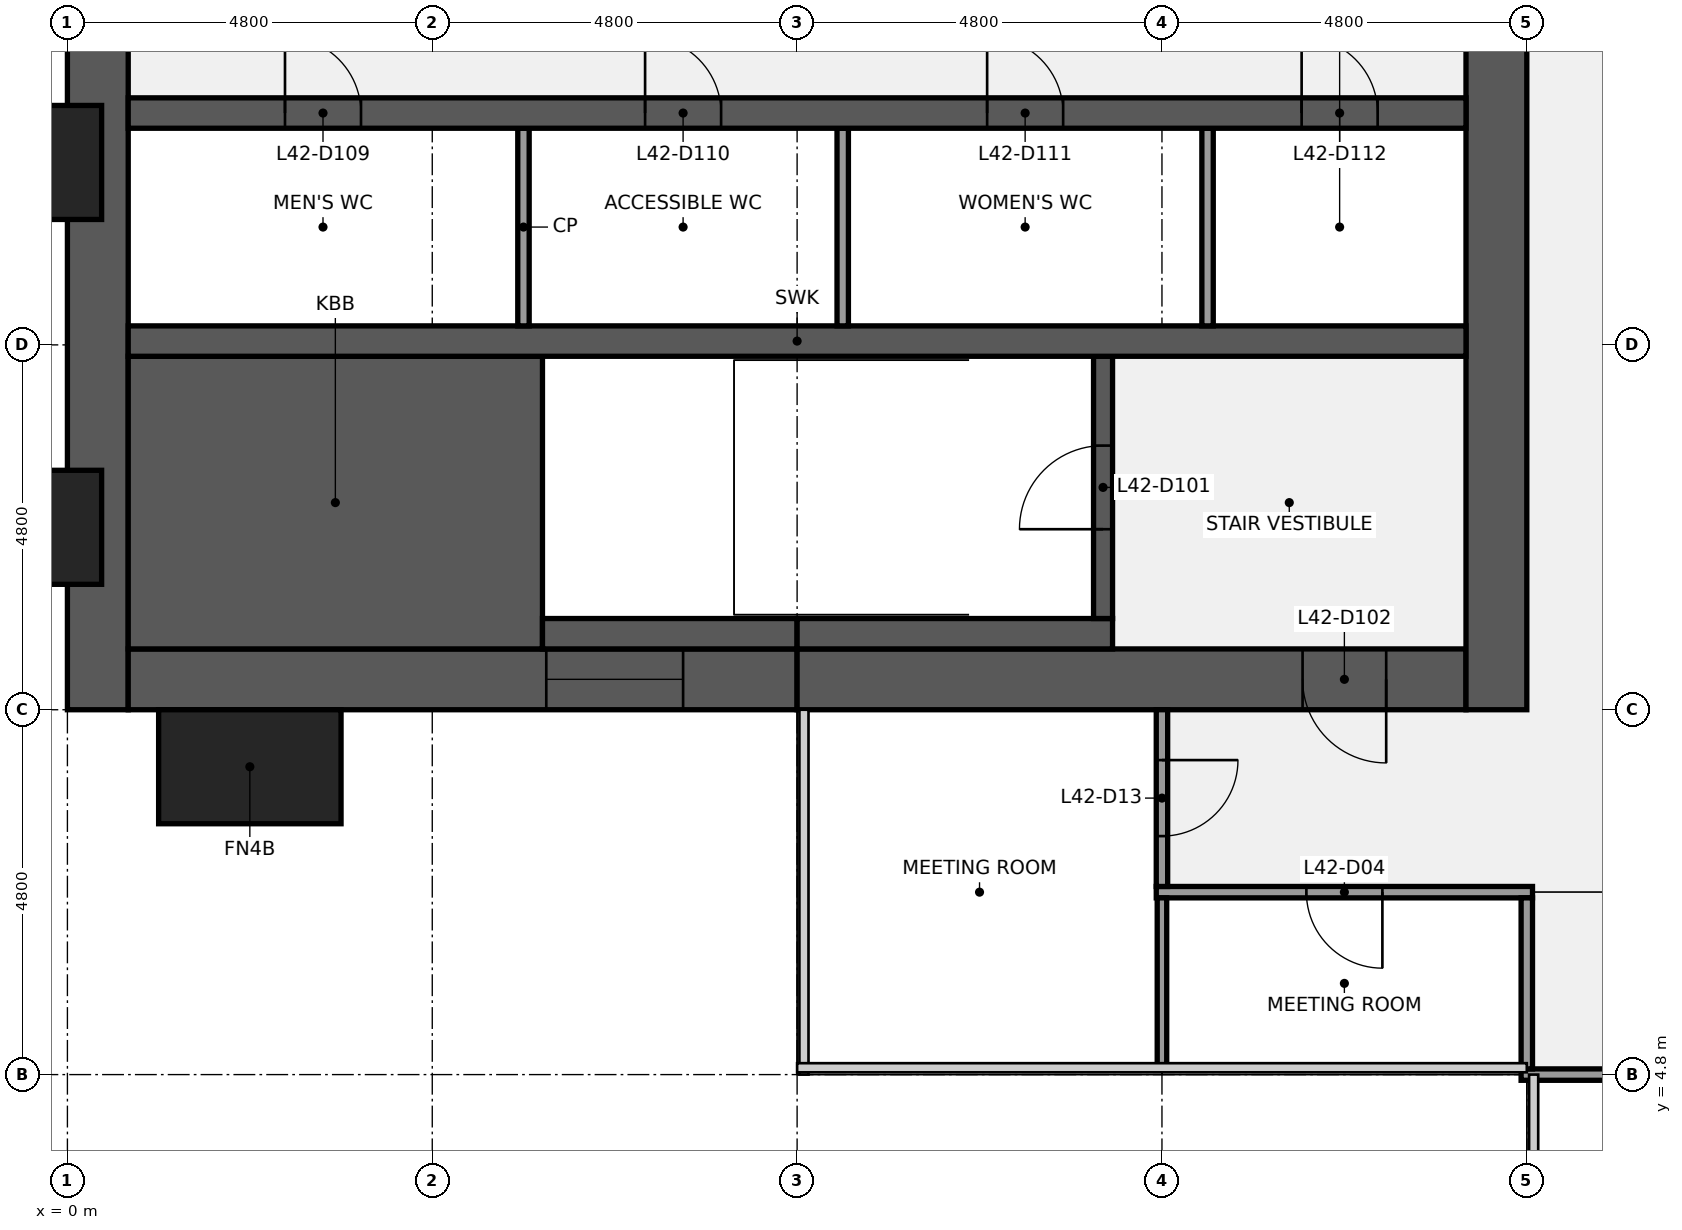
"""IFC4 building model, lengths in metres.
Left out: names, types, materials, properties, quantities, classifications, styles, units other than length and angle.
Written with IfcOpenShell. Run it as: python <this file> out.ifc"""

import sys

from ifc_helpers import new_model, si_unit, direction, frame, frame_2d, origin, origin_2d, place, context, subcontext, project, spatial, rectangle, extrude, element, fill, save


model = new_model("IFC4")
c1 = context("Model", 3, precision=1e-05, world=origin(), true_north=direction((0.0, 1.0)))
c2 = subcontext(c1, "Body", "Model", "MODEL_VIEW")
j1 = project(units=[si_unit("LENGTHUNIT", "METRE"), si_unit("PLANEANGLEUNIT", "RADIAN")], contexts=[c1])
p1 = place(None, origin())
s1 = spatial("IfcSite", under=j1, at=p1, CompositionType="ELEMENT")
p2 = place(p1, origin())
s2 = spatial("IfcBuilding", under=s1, at=p2, CompositionType="ELEMENT")
p3 = place(p2, frame((0.0, 0.0, 197.2)))
s3 = spatial("IfcBuildingStorey", under=s2, at=p3, CompositionType="ELEMENT", Elevation=197.2)
p4 = place(p3, frame((0.4, 9.6, 0.0), z_axis=(0.0, 0.0, 1.0), x_axis=(0.0, 1.0, 0.0)))
e1 = element("IfcWall", 1, at=p4, inside=s3, PredefinedType="SHEAR", context=c2, shape_type="SweptSolid", body=[
    extrude(rectangle(XDim=28.8, YDim=0.8, at=frame_2d((14.4, 0.0))), origin(), (0.0, 0.0, 1.0), 3.84),
])
p5 = place(p4, frame((8.85, 0.0, 0.9)))
e2 = element("IfcOpeningElement", 2, at=p5, cuts=e1, PredefinedType="OPENING", context=c2, shape_type="SweptSolid", body=[
    extrude(rectangle(XDim=1.5, YDim=1.5, at=frame_2d((0.75, 0.75))), frame((0.0, 0.41, 0.0), z_axis=(0.0, -1.0, 0.0), x_axis=(1.0, 0.0, 0.0)), (0.0, 0.0, 1.0), 0.82),
])
p6 = place(p4, frame((18.45, 0.0, 0.9)))
e3 = element("IfcOpeningElement", 3, at=p6, cuts=e1, PredefinedType="OPENING", context=c2, shape_type="SweptSolid", body=[
    extrude(rectangle(XDim=1.5, YDim=1.5, at=frame_2d((0.75, 0.75))), frame((0.0, 0.41, 0.0), z_axis=(0.0, -1.0, 0.0), x_axis=(1.0, 0.0, 0.0)), (0.0, 0.0, 1.0), 0.82),
])
p7 = place(p3, frame((9.6, 10.0, 0.0), z_axis=(0.0, 0.0, 1.0), x_axis=(-1.0, 0.0, 0.0)))
e4 = element("IfcWall", 4, at=p7, inside=s3, PredefinedType="SHEAR", context=c2, shape_type="SweptSolid", body=[
    extrude(rectangle(XDim=8.8, YDim=0.8, at=frame_2d((4.4, 0.0))), origin(), (0.0, 0.0, 1.0), 3.84),
])
p8 = place(p7, frame((1.5, 0.0, 0.9)))
e5 = element("IfcOpeningElement", 5, at=p8, cuts=e4, PredefinedType="OPENING", context=c2, shape_type="SweptSolid", body=[
    extrude(rectangle(XDim=1.8, YDim=1.5, at=frame_2d((0.9, 0.75))), frame((0.0, 0.41, 0.0), z_axis=(0.0, -1.0, 0.0), x_axis=(1.0, 0.0, 0.0)), (0.0, 0.0, 1.0), 0.82),
])
p9 = place(p3, frame((18.4, 10.0, 0.0), z_axis=(0.0, 0.0, 1.0), x_axis=(-1.0, 0.0, 0.0)))
e6 = element("IfcWall", 6, at=p9, inside=s3, PredefinedType="SHEAR", context=c2, shape_type="SweptSolid", body=[
    extrude(rectangle(XDim=8.8, YDim=0.8, at=frame_2d((4.4, 0.0))), origin(), (0.0, 0.0, 1.0), 3.84),
])
p10 = place(p9, frame((1.05, 0.0, 0.0)))
e7 = element("IfcOpeningElement", 7, at=p10, cuts=e6, PredefinedType="OPENING", context=c2, shape_type="SweptSolid", body=[
    extrude(rectangle(XDim=1.1, YDim=2.1, at=frame_2d((0.55, 1.05))), frame((0.0, 0.41, 0.0), z_axis=(0.0, -1.0, 0.0), x_axis=(1.0, 0.0, 0.0)), (0.0, 0.0, 1.0), 0.82),
])
p11 = place(p3, frame((18.8, 38.4, 0.0), z_axis=(0.0, 0.0, 1.0), x_axis=(0.0, -1.0, 0.0)))
e8 = element("IfcWall", 8, at=p11, inside=s3, PredefinedType="SHEAR", context=c2, shape_type="SweptSolid", body=[
    extrude(rectangle(XDim=28.8, YDim=0.8, at=frame_2d((14.4, 0.0))), origin(), (0.0, 0.0, 1.0), 3.84),
])
p12 = place(p11, frame((18.3, 0.0, 0.0)))
e9 = element("IfcOpeningElement", 9, at=p12, cuts=e8, PredefinedType="OPENING", context=c2, shape_type="SweptSolid", body=[
    extrude(rectangle(XDim=1.8, YDim=2.1, at=frame_2d((0.9, 1.05))), frame((0.0, 0.41, 0.0), z_axis=(0.0, -1.0, 0.0), x_axis=(1.0, 0.0, 0.0)), (0.0, 0.0, 1.0), 0.82),
])
p13 = place(p11, frame((8.7, 0.0, 0.0)))
e10 = element("IfcOpeningElement", 10, at=p13, cuts=e8, PredefinedType="OPENING", context=c2, shape_type="SweptSolid", body=[
    extrude(rectangle(XDim=1.8, YDim=2.1, at=frame_2d((0.9, 1.05))), frame((0.0, 0.41, 0.0), z_axis=(0.0, -1.0, 0.0), x_axis=(1.0, 0.0, 0.0)), (0.0, 0.0, 1.0), 0.82),
])
p14 = place(p3, frame((0.8, 12.325, 0.0), z_axis=(0.0, 0.0, 1.0), x_axis=(1.0, 0.0, 0.0)))
e11 = element("IfcWall", 11, at=p14, inside=s3, PredefinedType="SHEAR", context=c2, shape_type="SweptSolid", body=[
    extrude(rectangle(XDim=5.45, YDim=3.85, at=frame_2d((2.725, 0.0))), origin(), (0.0, 0.0, 1.0), 3.84),
])
p15 = place(p3, frame((6.25, 10.6, 0.0), z_axis=(0.0, 0.0, 1.0), x_axis=(1.0, 0.0, 0.0)))
e12 = element("IfcWall", 12, at=p15, inside=s3, PredefinedType="SHEAR", context=c2, shape_type="SweptSolid", body=[
    extrude(rectangle(XDim=3.35, YDim=0.4, at=frame_2d((1.675, 0.0))), origin(), (0.0, 0.0, 1.0), 3.84),
])
p16 = place(p3, frame((9.6, 10.6, 0.0), z_axis=(0.0, 0.0, 1.0), x_axis=(1.0, 0.0, 0.0)))
e13 = element("IfcWall", 13, at=p16, inside=s3, PredefinedType="SHEAR", context=c2, shape_type="SweptSolid", body=[
    extrude(rectangle(XDim=4.15, YDim=0.4, at=frame_2d((2.075, 0.0))), origin(), (0.0, 0.0, 1.0), 3.84),
])
p17 = place(p3, frame((13.625, 10.8, 0.0), z_axis=(0.0, 0.0, 1.0), x_axis=(0.0, 1.0, 0.0)))
e14 = element("IfcWall", 14, at=p17, inside=s3, PredefinedType="SHEAR", context=c2, shape_type="SweptSolid", body=[
    extrude(rectangle(XDim=3.45, YDim=0.25, at=frame_2d((1.725, 0.0))), origin(), (0.0, 0.0, 1.0), 3.84),
])
p18 = place(p17, frame((1.175, 0.0, 0.0)))
e15 = element("IfcOpeningElement", 15, at=p18, cuts=e14, PredefinedType="OPENING", context=c2, shape_type="SweptSolid", body=[
    extrude(rectangle(XDim=1.1, YDim=2.1, at=frame_2d((0.55, 1.05))), frame((0.0, 0.135, 0.0), z_axis=(0.0, -1.0, 0.0), x_axis=(1.0, 0.0, 0.0)), (0.0, 0.0, 1.0), 0.27),
])
p19 = place(p3, frame((0.8, 14.45, 0.0), z_axis=(0.0, 0.0, 1.0), x_axis=(1.0, 0.0, 0.0)))
e16 = element("IfcWall", 16, at=p19, inside=s3, PredefinedType="SHEAR", context=c2, shape_type="SweptSolid", body=[
    extrude(rectangle(XDim=17.6, YDim=0.4, at=frame_2d((8.8, 0.0))), origin(), (0.0, 0.0, 1.0), 3.84),
])
for number, where, z_axis, x_axis in (
    (17, (6.0, 14.65, 0.0), (0.0, 0.0, 1.0), (0.0, 1.0, 0.0)),
    (18, (10.2, 14.65, 0.0), (0.0, 0.0, 1.0), (0.0, 1.0, 0.0)),
    (19, (15.0, 14.65, 0.0), (0.0, 0.0, 1.0), (0.0, 1.0, 0.0)),
):
    element("IfcWall", number, at=place(p3, frame(where, z_axis=z_axis, x_axis=x_axis)), inside=s3, PredefinedType="PARTITIONING", context=c2, shape_type="SweptSolid", body=[
        extrude(rectangle(XDim=2.6, YDim=0.15, at=frame_2d((1.3, 0.0))), origin(), (0.0, 0.0, 1.0), 3.84),
    ])
p20 = place(p3, frame((0.8, 17.45, 0.0), z_axis=(0.0, 0.0, 1.0), x_axis=(1.0, 0.0, 0.0)))
e20 = element("IfcWall", 20, at=p20, inside=s3, PredefinedType="SHEAR", context=c2, shape_type="SweptSolid", body=[
    extrude(rectangle(XDim=17.6, YDim=0.4, at=frame_2d((8.8, 0.0))), origin(), (0.0, 0.0, 1.0), 3.84),
])
p21 = place(p20, frame((2.062, 0.0, 0.0)))
e21 = element("IfcOpeningElement", 21, at=p21, cuts=e20, PredefinedType="OPENING", context=c2, shape_type="SweptSolid", body=[
    extrude(rectangle(XDim=1.0, YDim=2.1, at=frame_2d((0.5, 1.05))), frame((0.0, 0.21, 0.0), z_axis=(0.0, -1.0, 0.0), x_axis=(1.0, 0.0, 0.0)), (0.0, 0.0, 1.0), 0.42),
])
p22 = place(p20, frame((6.8, 0.0, 0.0)))
e22 = element("IfcOpeningElement", 22, at=p22, cuts=e20, PredefinedType="OPENING", context=c2, shape_type="SweptSolid", body=[
    extrude(rectangle(XDim=1.0, YDim=2.1, at=frame_2d((0.5, 1.05))), frame((0.0, 0.21, 0.0), z_axis=(0.0, -1.0, 0.0), x_axis=(1.0, 0.0, 0.0)), (0.0, 0.0, 1.0), 0.42),
])
p23 = place(p20, frame((11.3, 0.0, 0.0)))
e23 = element("IfcOpeningElement", 23, at=p23, cuts=e20, PredefinedType="OPENING", context=c2, shape_type="SweptSolid", body=[
    extrude(rectangle(XDim=1.0, YDim=2.1, at=frame_2d((0.5, 1.05))), frame((0.0, 0.21, 0.0), z_axis=(0.0, -1.0, 0.0), x_axis=(1.0, 0.0, 0.0)), (0.0, 0.0, 1.0), 0.42),
])
p24 = place(p20, frame((15.438, 0.0, 0.0)))
e24 = element("IfcOpeningElement", 24, at=p24, cuts=e20, PredefinedType="OPENING", context=c2, shape_type="SweptSolid", body=[
    extrude(rectangle(XDim=1.0, YDim=2.1, at=frame_2d((0.5, 1.05))), frame((0.0, 0.21, 0.0), z_axis=(0.0, -1.0, 0.0), x_axis=(1.0, 0.0, 0.0)), (0.0, 0.0, 1.0), 0.42),
])
p25 = place(p3, frame((19.125, 4.8, 0.0), z_axis=(0.0, 0.0, 1.0), x_axis=(1.0, 0.0, 0.0)))
e25 = element("IfcWall", 25, at=p25, inside=s3, PredefinedType="PARTITIONING", context=c2, shape_type="SweptSolid", body=[
    extrude(rectangle(XDim=19.35, YDim=0.15, at=frame_2d((9.675, 0.0))), origin(), (0.0, 0.0, 1.0), 2.87),
])
p26 = place(p25, frame((5.575, 0.0, 0.0)))
e26 = element("IfcOpeningElement", 26, at=p26, cuts=e25, PredefinedType="OPENING", context=c2, shape_type="SweptSolid", body=[
    extrude(rectangle(XDim=1.0, YDim=2.1, at=frame_2d((0.5, 1.05))), frame((0.0, 0.085, 0.0), z_axis=(0.0, -1.0, 0.0), x_axis=(1.0, 0.0, 0.0)), (0.0, 0.0, 1.0), 0.17),
])
p27 = place(p25, frame((13.975, 0.0, 0.0)))
e27 = element("IfcOpeningElement", 27, at=p27, cuts=e25, PredefinedType="OPENING", context=c2, shape_type="SweptSolid", body=[
    extrude(rectangle(XDim=1.0, YDim=2.1, at=frame_2d((0.5, 1.05))), frame((0.0, 0.085, 0.0), z_axis=(0.0, -1.0, 0.0), x_axis=(1.0, 0.0, 0.0)), (0.0, 0.0, 1.0), 0.17),
])
p28 = place(p25, frame((17.575, 0.0, 0.0)))
e28 = element("IfcOpeningElement", 28, at=p28, cuts=e25, PredefinedType="OPENING", context=c2, shape_type="SweptSolid", body=[
    extrude(rectangle(XDim=1.0, YDim=2.1, at=frame_2d((0.5, 1.05))), frame((0.0, 0.085, 0.0), z_axis=(0.0, -1.0, 0.0), x_axis=(1.0, 0.0, 0.0)), (0.0, 0.0, 1.0), 0.17),
])
p29 = place(p3, frame((14.325, 7.2, 0.0), z_axis=(0.0, 0.0, 1.0), x_axis=(1.0, 0.0, 0.0)))
e29 = element("IfcWall", 29, at=p29, inside=s3, PredefinedType="PARTITIONING", context=c2, shape_type="SweptSolid", body=[
    extrude(rectangle(XDim=4.95, YDim=0.15, at=frame_2d((2.475, 0.0))), origin(), (0.0, 0.0, 1.0), 2.87),
])
p30 = place(p29, frame((1.975, 0.0, 0.0)))
e30 = element("IfcOpeningElement", 30, at=p30, cuts=e29, PredefinedType="OPENING", context=c2, shape_type="SweptSolid", body=[
    extrude(rectangle(XDim=1.0, YDim=2.1, at=frame_2d((0.5, 1.05))), frame((0.0, 0.085, 0.0), z_axis=(0.0, -1.0, 0.0), x_axis=(1.0, 0.0, 0.0)), (0.0, 0.0, 1.0), 0.17),
])
p31 = place(p3, frame((14.4, 4.9, 0.0), z_axis=(0.0, 0.0, 1.0), x_axis=(0.0, 1.0, 0.0)))
e31 = element("IfcWall", 31, at=p31, inside=s3, PredefinedType="PARTITIONING", context=c2, shape_type="SweptSolid", body=[
    extrude(rectangle(XDim=2.225, YDim=0.125, at=frame_2d((1.113, 0.0))), origin(), (0.0, 0.0, 1.0), 2.87),
])
p32 = place(p3, frame((14.4, 7.275, 0.0), z_axis=(0.0, 0.0, 1.0), x_axis=(0.0, 1.0, 0.0)))
e32 = element("IfcWall", 32, at=p32, inside=s3, PredefinedType="PARTITIONING", context=c2, shape_type="SweptSolid", body=[
    extrude(rectangle(XDim=2.325, YDim=0.15, at=frame_2d((1.163, 0.0))), origin(), (0.0, 0.0, 1.0), 2.87),
])
p33 = place(p32, frame((0.663, 0.0, 0.0)))
e33 = element("IfcOpeningElement", 33, at=p33, cuts=e32, PredefinedType="OPENING", context=c2, shape_type="SweptSolid", body=[
    extrude(rectangle(XDim=1.0, YDim=2.1, at=frame_2d((0.5, 1.05))), frame((0.0, 0.085, 0.0), z_axis=(0.0, -1.0, 0.0), x_axis=(1.0, 0.0, 0.0)), (0.0, 0.0, 1.0), 0.17),
])
p34 = place(p3, frame((19.2, 4.875, 0.0), z_axis=(0.0, 0.0, 1.0), x_axis=(0.0, 1.0, 0.0)))
e34 = element("IfcWall", 34, at=p34, inside=s3, PredefinedType="PARTITIONING", context=c2, shape_type="SweptSolid", body=[
    extrude(rectangle(XDim=2.25, YDim=0.15, at=frame_2d((1.125, 0.0))), origin(), (0.0, 0.0, 1.0), 2.87),
])
for number, where, z_axis, x_axis in (
    (35, (-0.75, 12.0, 0.0), (0.0, 0.0, 1.0), (0.0, 1.0, 0.0)),
    (36, (-0.75, 16.8, 0.0), (0.0, 0.0, 1.0), (0.0, 1.0, 0.0)),
    (37, (2.4, 8.85, 0.0), (0.0, 0.0, 1.0), (1.0, 0.0, 0.0)),
):
    element("IfcColumn", number, at=place(p3, frame(where, z_axis=z_axis, x_axis=x_axis)), inside=s3, PredefinedType="PILASTER", context=c2, shape_type="SweptSolid", body=[
        extrude(rectangle(XDim=2.4, YDim=1.5, at=origin_2d()), origin(), (0.0, 0.0, 1.0), 4.0),
    ])
p35 = place(p18, origin())
e38 = element("IfcDoor", 38, at=p35, inside=s3, OperationType="SINGLE_SWING_LEFT", PredefinedType="DOOR", context=c2, shape_type="SweptSolid", body=[
    extrude(rectangle(XDim=1.1, YDim=2.1, at=frame_2d((0.55, 1.05))), frame((0.0, 0.025, 0.0), z_axis=(0.0, -1.0, 0.0), x_axis=(1.0, 0.0, 0.0)), (0.0, 0.0, 1.0), 0.05),
])
fill(e15, e38)
p36 = place(p10, origin())
e39 = element("IfcDoor", 39, at=p36, inside=s3, OperationType="SINGLE_SWING_LEFT", PredefinedType="DOOR", context=c2, shape_type="SweptSolid", body=[
    extrude(rectangle(XDim=1.1, YDim=2.1, at=frame_2d((0.55, 1.05))), frame((0.0, 0.025, 0.0), z_axis=(0.0, -1.0, 0.0), x_axis=(1.0, 0.0, 0.0)), (0.0, 0.0, 1.0), 0.05),
])
fill(e7, e39)
p37 = place(p21, origin())
e40 = element("IfcDoor", 40, at=p37, inside=s3, OperationType="SINGLE_SWING_LEFT", PredefinedType="DOOR", context=c2, shape_type="SweptSolid", body=[
    extrude(rectangle(XDim=1.0, YDim=2.1, at=frame_2d((0.5, 1.05))), frame((0.0, 0.025, 0.0), z_axis=(0.0, -1.0, 0.0), x_axis=(1.0, 0.0, 0.0)), (0.0, 0.0, 1.0), 0.05),
])
fill(e21, e40)
p38 = place(p22, origin())
e41 = element("IfcDoor", 41, at=p38, inside=s3, OperationType="SINGLE_SWING_LEFT", PredefinedType="DOOR", context=c2, shape_type="SweptSolid", body=[
    extrude(rectangle(XDim=1.0, YDim=2.1, at=frame_2d((0.5, 1.05))), frame((0.0, 0.025, 0.0), z_axis=(0.0, -1.0, 0.0), x_axis=(1.0, 0.0, 0.0)), (0.0, 0.0, 1.0), 0.05),
])
fill(e22, e41)
p39 = place(p23, origin())
e42 = element("IfcDoor", 42, at=p39, inside=s3, OperationType="SINGLE_SWING_LEFT", PredefinedType="DOOR", context=c2, shape_type="SweptSolid", body=[
    extrude(rectangle(XDim=1.0, YDim=2.1, at=frame_2d((0.5, 1.05))), frame((0.0, 0.025, 0.0), z_axis=(0.0, -1.0, 0.0), x_axis=(1.0, 0.0, 0.0)), (0.0, 0.0, 1.0), 0.05),
])
fill(e23, e42)
p40 = place(p24, origin())
e43 = element("IfcDoor", 43, at=p40, inside=s3, OperationType="SINGLE_SWING_LEFT", PredefinedType="DOOR", context=c2, shape_type="SweptSolid", body=[
    extrude(rectangle(XDim=1.0, YDim=2.1, at=frame_2d((0.5, 1.05))), frame((0.0, 0.025, 0.0), z_axis=(0.0, -1.0, 0.0), x_axis=(1.0, 0.0, 0.0)), (0.0, 0.0, 1.0), 0.05),
])
fill(e24, e43)
p41 = place(p8, origin())
e44 = element("IfcWindow", 44, at=p41, inside=s3, PartitioningType="SINGLE_PANEL", PredefinedType="WINDOW", context=c2, shape_type="SweptSolid", body=[
    extrude(rectangle(XDim=1.8, YDim=1.5, at=frame_2d((0.9, 0.75))), frame((0.0, 0.03, 0.0), z_axis=(0.0, -1.0, 0.0), x_axis=(1.0, 0.0, 0.0)), (0.0, 0.0, 1.0), 0.06),
])
fill(e5, e44)
p42 = place(p30, origin())
e45 = element("IfcDoor", 45, at=p42, inside=s3, OperationType="SINGLE_SWING_RIGHT", PredefinedType="DOOR", context=c2, shape_type="SweptSolid", body=[
    extrude(rectangle(XDim=1.0, YDim=2.1, at=frame_2d((0.5, 1.05))), frame((0.0, 0.025, 0.0), z_axis=(0.0, -1.0, 0.0), x_axis=(1.0, 0.0, 0.0)), (0.0, 0.0, 1.0), 0.05),
])
fill(e30, e45)
p43 = place(p33, origin())
e46 = element("IfcDoor", 46, at=p43, inside=s3, OperationType="SINGLE_SWING_RIGHT", PredefinedType="DOOR", context=c2, shape_type="SweptSolid", body=[
    extrude(rectangle(XDim=1.0, YDim=2.1, at=frame_2d((0.5, 1.05))), frame((0.0, 0.025, 0.0), z_axis=(0.0, -1.0, 0.0), x_axis=(1.0, 0.0, 0.0)), (0.0, 0.0, 1.0), 0.05),
])
fill(e33, e46)
save(model, sys.argv[1])
